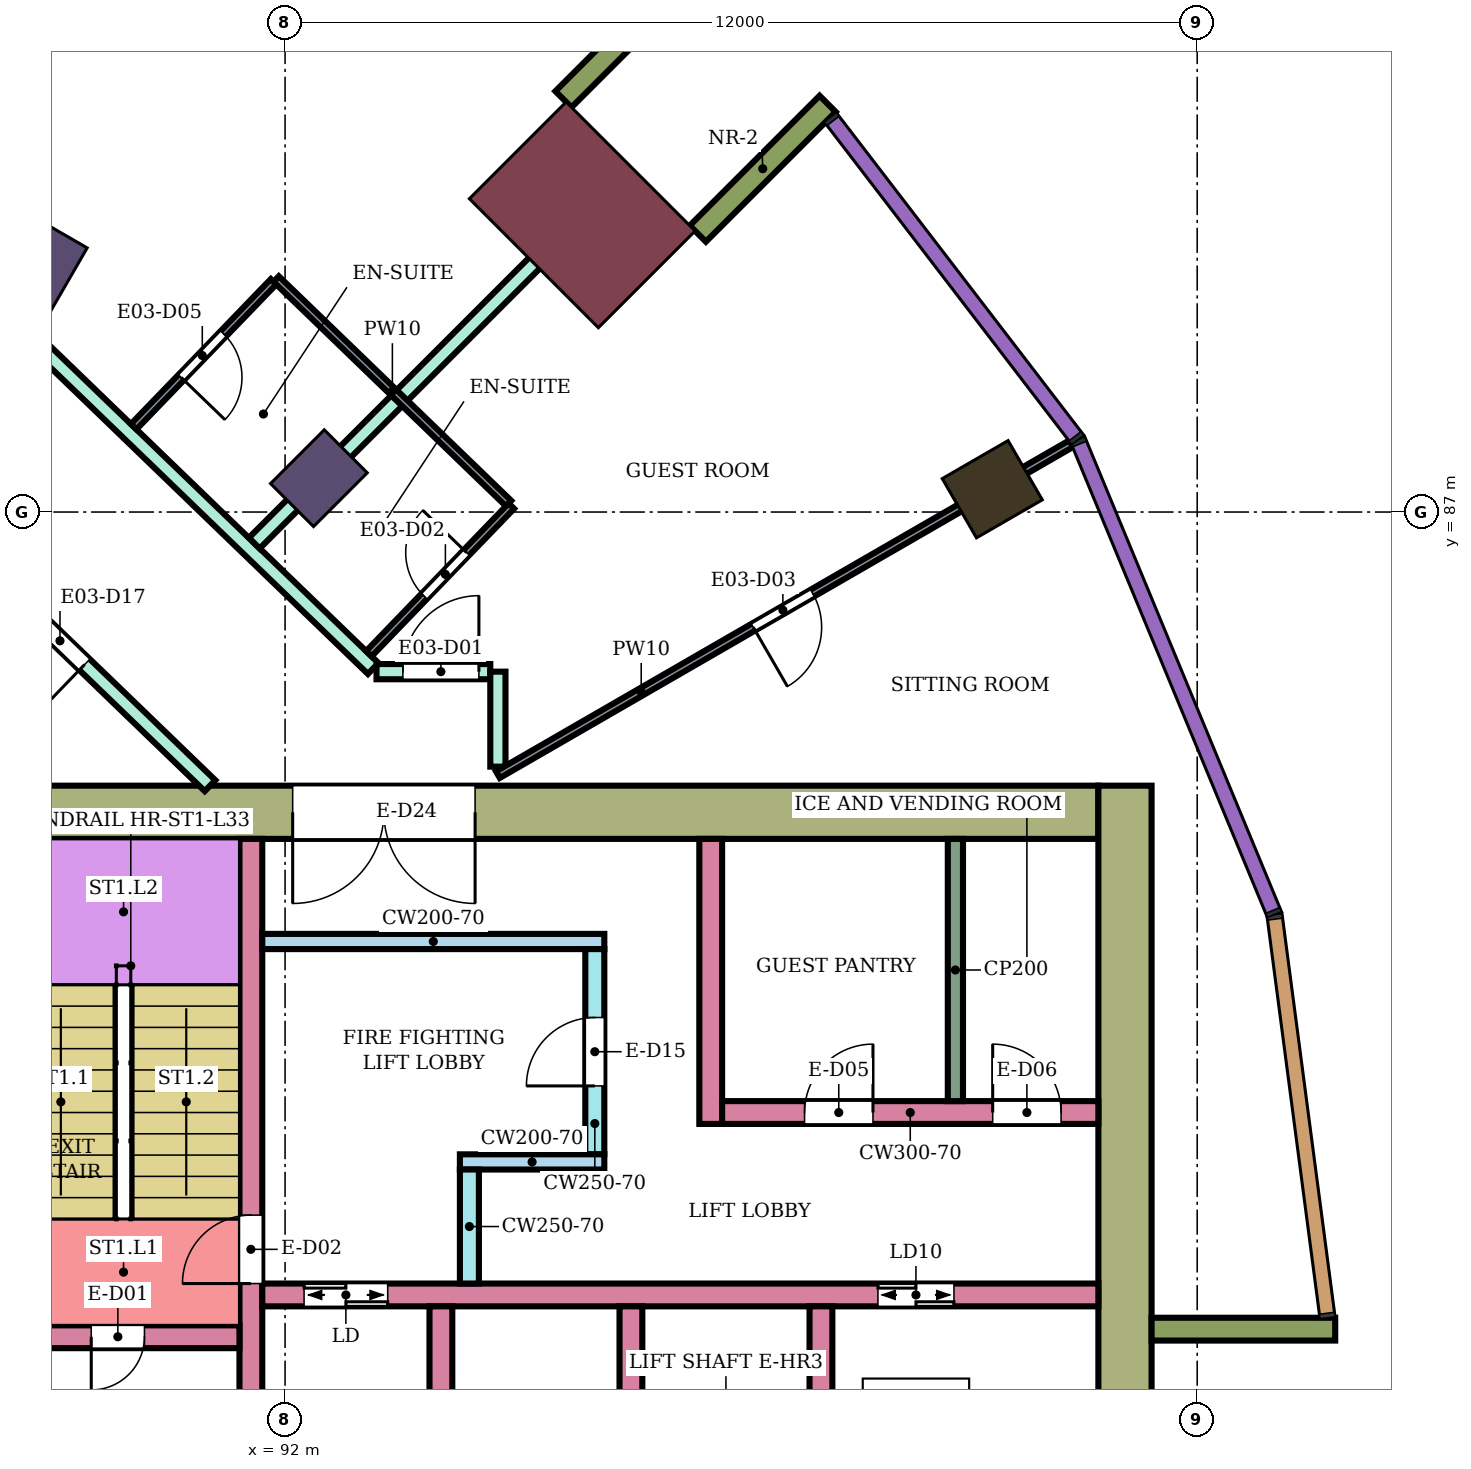
"""IFC4 building model, lengths in metres.
Left out: names, types, materials, properties, quantities, classifications, styles, units other than length and angle.
Written with IfcOpenShell. Run it as: python <this file> out.ifc"""

import sys

from ifc_helpers import new_model, si_unit, direction, frame, frame_2d, origin, origin_2d, place, context, subcontext, project, spatial, rectangle, extrude, element, fill, save


model = new_model("IFC4")
c1 = context("Model", 3, precision=1e-05, world=origin(), true_north=direction((0.0, 1.0)))
c2 = subcontext(c1, "Body", "Model", "MODEL_VIEW")
j1 = project(units=[si_unit("LENGTHUNIT", "METRE"), si_unit("PLANEANGLEUNIT", "RADIAN")], contexts=[c1])
p1 = place(None, origin())
s1 = spatial("IfcSite", under=j1, at=p1, CompositionType="ELEMENT")
p2 = place(p1, origin())
s2 = spatial("IfcBuilding", under=s1, at=p2, CompositionType="ELEMENT")
p3 = place(p2, frame((0.0, 0.0, 141.9)))
s3 = spatial("IfcBuildingStorey", under=s2, at=p3, CompositionType="ELEMENT", Elevation=141.9)
p4 = place(p3, frame((101.304, 87.3, 0.0), z_axis=(0.0, 0.0, 1.0), x_axis=(0.866025403784, 0.5, 0.0)))
e1 = element("IfcColumn", 1, at=p4, inside=s3, PredefinedType="COLUMN", context=c2, shape_type="SweptSolid", body=[
    extrude(rectangle(XDim=1.0, YDim=0.9, at=origin_2d()), origin(), (0.0, 0.0, 1.0), 3.9),
])
for number, where, z_axis, x_axis in (
    (2, (92.445, 87.445, 0.0), (0.0, 0.0, 1.0), (0.707, 0.707, 0.0)),
    (3, (88.8, 90.242, 0.0), (0.0, 0.0, 1.0), (0.5, 0.866, 0.0)),
):
    element("IfcColumn", number, at=place(p3, frame(where, z_axis=z_axis, x_axis=x_axis)), inside=s3, PredefinedType="COLUMN", context=c2, shape_type="SweptSolid", body=[
        extrude(rectangle(XDim=1.0, YDim=0.8, at=origin_2d()), origin(), (0.0, 0.0, 1.0), 3.9),
    ])
p5 = place(p3, frame((95.91, 90.91, 0.0), z_axis=(0.0, 0.0, 1.0), x_axis=(0.707106781187, 0.707106781187, 0.0)))
e4 = element("IfcColumn", 4, at=p5, inside=s3, PredefinedType="COLUMN", context=c2, shape_type="SweptSolid", body=[
    extrude(rectangle(XDim=1.8, YDim=2.4, at=origin_2d()), origin(), (0.0, 0.0, 1.0), 3.9),
])
p6 = place(p3, frame((87.9, 83.05, 0.0), z_axis=(0.0, 0.0, 1.0), x_axis=(1.0, 0.0, 0.0)))
e5 = element("IfcWall", 5, at=p6, inside=s3, PredefinedType="SHEAR", context=c2, shape_type="SweptSolid", body=[
    extrude(rectangle(XDim=14.8, YDim=0.7, at=frame_2d((7.4, 0.0))), origin(), (0.0, 0.0, 1.0), 3.58),
])
p7 = place(p6, frame((4.2, 0.0, 0.0)))
e6 = element("IfcOpeningElement", 6, at=p7, cuts=e5, PredefinedType="OPENING", context=c2, shape_type="SweptSolid", body=[
    extrude(rectangle(XDim=2.4, YDim=2.4, at=frame_2d((1.2, 1.2))), frame((0.0, 0.36, 0.0), z_axis=(0.0, -1.0, 0.0), x_axis=(1.0, 0.0, 0.0)), (0.0, 0.0, 1.0), 0.72),
])
p8 = place(p3, frame((103.05, 66.6, 0.0), z_axis=(0.0, 0.0, 1.0), x_axis=(0.0, 1.0, 0.0)))
e7 = element("IfcWall", 7, at=p8, inside=s3, PredefinedType="SHEAR", context=c2, shape_type="SweptSolid", body=[
    extrude(rectangle(XDim=16.8, YDim=0.7, at=frame_2d((8.4, 0.0))), origin(), (0.0, 0.0, 1.0), 3.58),
])
p9 = place(p3, frame((91.55, 75.0, 0.0), z_axis=(0.0, 0.0, 1.0), x_axis=(0.0, 1.0, 0.0)))
e8 = element("IfcWall", 8, at=p9, inside=s3, PredefinedType="SHEAR", context=c2, shape_type="SweptSolid", body=[
    extrude(rectangle(XDim=7.7, YDim=0.3, at=frame_2d((3.85, 0.0))), origin(), (0.0, 0.0, 1.0), 3.58),
])
p10 = place(p9, frame((1.85, 0.0, 0.0)))
e9 = element("IfcOpeningElement", 9, at=p10, cuts=e8, PredefinedType="OPENING", context=c2, shape_type="SweptSolid", body=[
    extrude(rectangle(XDim=0.9, YDim=2.1, at=frame_2d((0.45, 1.05))), frame((0.0, 0.16, 0.0), z_axis=(0.0, -1.0, 0.0), x_axis=(1.0, 0.0, 0.0)), (0.0, 0.0, 1.0), 0.32),
])
p11 = place(p3, frame((88.35, 76.15, 0.0), z_axis=(0.0, 0.0, 1.0), x_axis=(1.0, 0.0, 0.0)))
e10 = element("IfcWall", 10, at=p11, inside=s3, PredefinedType="SHEAR", context=c2, shape_type="SweptSolid", body=[
    extrude(rectangle(XDim=3.05, YDim=0.3, at=frame_2d((1.525, 0.0))), origin(), (0.0, 0.0, 1.0), 3.58),
])
p12 = place(p11, frame((1.1, 0.0, 0.0)))
e11 = element("IfcOpeningElement", 11, at=p12, cuts=e10, PredefinedType="OPENING", context=c2, shape_type="SweptSolid", body=[
    extrude(rectangle(XDim=0.7, YDim=2.0, at=frame_2d((0.35, 1.0))), frame((0.0, 0.16, 0.0), z_axis=(0.0, -1.0, 0.0), x_axis=(1.0, 0.0, 0.0)), (0.0, 0.0, 1.0), 0.32),
])
p13 = place(p3, frame((91.7, 76.7, 0.0), z_axis=(0.0, 0.0, 1.0), x_axis=(1.0, 0.0, 0.0)))
e12 = element("IfcWall", 12, at=p13, inside=s3, PredefinedType="SHEAR", context=c2, shape_type="SweptSolid", body=[
    extrude(rectangle(XDim=11.0, YDim=0.3, at=frame_2d((5.5, 0.0))), origin(), (0.0, 0.0, 1.0), 3.58),
])
p14 = place(p13, frame((0.55, 0.0, 0.0)))
e13 = element("IfcOpeningElement", 13, at=p14, cuts=e12, PredefinedType="OPENING", context=c2, shape_type="SweptSolid", body=[
    extrude(rectangle(XDim=1.1, YDim=2.1, at=frame_2d((0.55, 1.05))), frame((0.0, 0.16, 0.0), z_axis=(0.0, -1.0, 0.0), x_axis=(1.0, 0.0, 0.0)), (0.0, 0.0, 1.0), 0.32),
])
p15 = place(p13, frame((8.1, 0.0, 0.0)))
e14 = element("IfcOpeningElement", 14, at=p15, cuts=e12, PredefinedType="OPENING", context=c2, shape_type="SweptSolid", body=[
    extrude(rectangle(XDim=1.0, YDim=2.1, at=frame_2d((0.5, 1.05))), frame((0.0, 0.16, 0.0), z_axis=(0.0, -1.0, 0.0), x_axis=(1.0, 0.0, 0.0)), (0.0, 0.0, 1.0), 0.32),
])
for number, where, z_axis, x_axis in (
    (15, (94.05, 74.0, 0.0), (0.0, 0.0, 1.0), (0.0, 1.0, 0.0)),
    (16, (96.55, 74.0, 0.0), (0.0, 0.0, 1.0), (0.0, 1.0, 0.0)),
    (17, (99.05, 74.0, 0.0), (0.0, 0.0, 1.0), (0.0, 1.0, 0.0)),
):
    element("IfcWall", number, at=place(p3, frame(where, z_axis=z_axis, x_axis=x_axis)), inside=s3, PredefinedType="SHEAR", context=c2, shape_type="SweptSolid", body=[
        extrude(rectangle(XDim=2.55, YDim=0.3, at=frame_2d((1.275, 0.0))), origin(), (0.0, 0.0, 1.0), 3.58),
    ])
p16 = place(p3, frame((91.7, 81.35, 0.0), z_axis=(0.0, 0.0, 1.0), x_axis=(1.0, 0.0, 0.0)))
e18 = element("IfcWall", 18, at=p16, inside=s3, PredefinedType="SHEAR", context=c2, shape_type="SweptSolid", body=[
    extrude(rectangle(XDim=4.5, YDim=0.2, at=frame_2d((2.25, 0.0))), origin(), (0.0, 0.0, 1.0), 3.58),
])
p17 = place(p3, frame((96.075, 78.55, 0.0), z_axis=(0.0, 0.0, 1.0), x_axis=(0.0, 1.0, 0.0)))
e19 = element("IfcWall", 19, at=p17, inside=s3, PredefinedType="SHEAR", context=c2, shape_type="SweptSolid", body=[
    extrude(rectangle(XDim=2.7, YDim=0.25, at=frame_2d((1.35, 0.0))), origin(), (0.0, 0.0, 1.0), 3.58),
])
p18 = place(p17, frame((0.9, 0.0, 0.0)))
e20 = element("IfcOpeningElement", 20, at=p18, cuts=e19, PredefinedType="OPENING", context=c2, shape_type="SweptSolid", body=[
    extrude(rectangle(XDim=0.9, YDim=2.1, at=frame_2d((0.45, 1.05))), frame((0.0, 0.135, 0.0), z_axis=(0.0, -1.0, 0.0), x_axis=(1.0, 0.0, 0.0)), (0.0, 0.0, 1.0), 0.27),
])
p19 = place(p3, frame((94.3, 78.45, 0.0), z_axis=(0.0, 0.0, 1.0), x_axis=(1.0, 0.0, 0.0)))
e21 = element("IfcWall", 21, at=p19, inside=s3, PredefinedType="SHEAR", context=c2, shape_type="SweptSolid", body=[
    extrude(rectangle(XDim=1.9, YDim=0.2, at=frame_2d((0.95, 0.0))), origin(), (0.0, 0.0, 1.0), 3.58),
])
p20 = place(p3, frame((94.425, 76.85, 0.0), z_axis=(0.0, 0.0, 1.0), x_axis=(0.0, 1.0, 0.0)))
e22 = element("IfcWall", 22, at=p20, inside=s3, PredefinedType="SHEAR", context=c2, shape_type="SweptSolid", body=[
    extrude(rectangle(XDim=1.5, YDim=0.25, at=frame_2d((0.75, 0.0))), origin(), (0.0, 0.0, 1.0), 3.58),
])
p21 = place(p3, frame((97.6, 78.95, 0.0), z_axis=(0.0, 0.0, 1.0), x_axis=(0.0, 1.0, 0.0)))
e23 = element("IfcWall", 23, at=p21, inside=s3, PredefinedType="SHEAR", context=c2, shape_type="SweptSolid", body=[
    extrude(rectangle(XDim=3.75, YDim=0.3, at=frame_2d((1.875, 0.0))), origin(), (0.0, 0.0, 1.0), 3.58),
])
p22 = place(p3, frame((97.75, 79.1, 0.0), z_axis=(0.0, 0.0, 1.0), x_axis=(1.0, 0.0, 0.0)))
e24 = element("IfcWall", 24, at=p22, inside=s3, PredefinedType="SHEAR", context=c2, shape_type="SweptSolid", body=[
    extrude(rectangle(XDim=4.95, YDim=0.3, at=frame_2d((2.475, 0.0))), origin(), (0.0, 0.0, 1.0), 3.58),
])
p23 = place(p22, frame((1.084, 0.0, 0.0)))
e25 = element("IfcOpeningElement", 25, at=p23, cuts=e24, PredefinedType="OPENING", context=c2, shape_type="SweptSolid", body=[
    extrude(rectangle(XDim=0.9, YDim=2.1, at=frame_2d((0.45, 1.05))), frame((0.0, 0.16, 0.0), z_axis=(0.0, -1.0, 0.0), x_axis=(1.0, 0.0, 0.0)), (0.0, 0.0, 1.0), 0.32),
])
p24 = place(p22, frame((3.56, 0.0, 0.0)))
e26 = element("IfcOpeningElement", 26, at=p24, cuts=e24, PredefinedType="OPENING", context=c2, shape_type="SweptSolid", body=[
    extrude(rectangle(XDim=0.9, YDim=2.1, at=frame_2d((0.45, 1.05))), frame((0.0, 0.16, 0.0), z_axis=(0.0, -1.0, 0.0), x_axis=(1.0, 0.0, 0.0)), (0.0, 0.0, 1.0), 0.32),
])
for number, where, z_axis, x_axis in (
    (27, (103.4, 76.25, 0.0), (0.0, 0.0, 1.0), (1.0, 0.0, 0.0)),
    (28, (97.43, 90.662, 0.0), (0.0, 0.0, 1.0), (0.707, 0.707, 0.0)),
    (29, (95.662, 92.43, 0.0), (0.0, 0.0, 1.0), (0.707, 0.707, 0.0)),
):
    element("IfcWall", number, at=place(p3, frame(where, z_axis=z_axis, x_axis=x_axis)), inside=s3, PredefinedType="NOTDEFINED", context=c2, shape_type="SweptSolid", body=[
        extrude(rectangle(XDim=2.416, YDim=0.3, at=frame_2d((1.208, 0.0))), origin(), (0.0, 0.0, 1.0), 3.9),
    ])
p25 = place(p3, frame((87.064, 87.211, 0.0), z_axis=(0.0, 0.0, 1.0), x_axis=(0.719562412484, -0.694427774891, 0.0)))
e30 = element("IfcWall", 30, at=p25, inside=s3, PredefinedType="PARTITIONING", context=c2, shape_type="SweptSolid", body=[
    extrude(rectangle(XDim=5.488, YDim=0.2, at=frame_2d((2.744, 0.0))), origin(), (0.0, 0.0, 1.0), 3.45),
])
p26 = place(p25, frame((2.294, 0.0, 0.0)))
e31 = element("IfcOpeningElement", 31, at=p26, cuts=e30, PredefinedType="OPENING", context=c2, shape_type="SweptSolid", body=[
    extrude(rectangle(XDim=0.9, YDim=2.1, at=frame_2d((0.45, 1.05))), frame((0.0, 0.11, 0.0), z_axis=(0.0, -1.0, 0.0), x_axis=(1.0, 0.0, 0.0)), (0.0, 0.0, 1.0), 0.22),
])
p27 = place(p3, frame((88.386, 89.549, 0.0), z_axis=(0.0, 0.0, 1.0), x_axis=(0.719507339337, -0.694484836869, 0.0)))
e32 = element("IfcWall", 32, at=p27, inside=s3, PredefinedType="PARTITIONING", context=c2, shape_type="SweptSolid", body=[
    extrude(rectangle(XDim=6.635, YDim=0.2, at=frame_2d((3.317, 0.0))), origin(), (0.0, 0.0, 1.0), 3.45),
])
p28 = place(p3, frame((91.595, 86.591, 0.0), z_axis=(0.0, 0.0, 1.0), x_axis=(0.707214399597, 0.706999146394, 0.0)))
e33 = element("IfcWall", 33, at=p28, inside=s3, PredefinedType="PARTITIONING", context=c2, shape_type="SweptSolid", body=[
    extrude(rectangle(XDim=6.805, YDim=0.2, at=frame_2d((3.403, 0.0))), origin(), (0.0, 0.0, 1.0), 3.45),
])
p29 = place(p3, frame((93.203, 84.9, 0.0), z_axis=(0.0, 0.0, 1.0), x_axis=(1.0, 0.0, 0.0)))
e34 = element("IfcWall", 34, at=p29, inside=s3, PredefinedType="PARTITIONING", context=c2, shape_type="SweptSolid", body=[
    extrude(rectangle(XDim=1.497, YDim=0.2, at=frame_2d((0.749, 0.0))), origin(), (0.0, 0.0, 1.0), 3.45),
])
p30 = place(p29, frame((0.347, 0.0, 0.0)))
e35 = element("IfcOpeningElement", 35, at=p30, cuts=e34, PredefinedType="OPENING", context=c2, shape_type="SweptSolid", body=[
    extrude(rectangle(XDim=1.0, YDim=2.1, at=frame_2d((0.5, 1.05))), frame((0.0, 0.11, 0.0), z_axis=(0.0, -1.0, 0.0), x_axis=(1.0, 0.0, 0.0)), (0.0, 0.0, 1.0), 0.22),
])
p31 = place(p3, frame((94.8, 83.65, 0.0), z_axis=(0.0, 0.0, 1.0), x_axis=(0.0, 1.0, 0.0)))
e36 = element("IfcWall", 36, at=p31, inside=s3, PredefinedType="PARTITIONING", context=c2, shape_type="SweptSolid", body=[
    extrude(rectangle(XDim=1.25, YDim=0.2, at=frame_2d((0.625, 0.0))), origin(), (0.0, 0.0, 1.0), 3.45),
])
p32 = place(p3, frame((90.008, 88.123, 0.0), z_axis=(0.0, 0.0, 1.0), x_axis=(0.694372521817, 0.719615731447, 0.0)))
e37 = element("IfcWall", 37, at=p32, inside=s3, PredefinedType="PARTITIONING", context=c2, shape_type="SweptSolid", body=[
    extrude(rectangle(XDim=2.65, YDim=0.1, at=frame_2d((1.325, 0.0))), origin(), (0.0, 0.0, 1.0), 3.45),
])
p33 = place(p32, frame((0.9, 0.0, 0.0)))
e38 = element("IfcOpeningElement", 38, at=p33, cuts=e37, PredefinedType="OPENING", context=c2, shape_type="SweptSolid", body=[
    extrude(rectangle(XDim=0.8, YDim=2.1, at=frame_2d((0.4, 1.05))), frame((0.0, 0.06, 0.0), z_axis=(0.0, -1.0, 0.0), x_axis=(1.0, 0.0, 0.0)), (0.0, 0.0, 1.0), 0.12),
])
p34 = place(p3, frame((91.883, 90.066, 0.0), z_axis=(0.0, 0.0, 1.0), x_axis=(0.719460839421, -0.694533008963, 0.0)))
e39 = element("IfcWall", 39, at=p34, inside=s3, PredefinedType="PARTITIONING", context=c2, shape_type="SweptSolid", body=[
    extrude(rectangle(XDim=4.25, YDim=0.1, at=frame_2d((2.125, 0.0))), origin(), (0.0, 0.0, 1.0), 3.45),
])
p35 = place(p3, frame((93.103, 85.136, 0.0), z_axis=(0.0, 0.0, 1.0), x_axis=(0.694287838235, 0.719697434815, 0.0)))
e40 = element("IfcWall", 40, at=p35, inside=s3, PredefinedType="PARTITIONING", context=c2, shape_type="SweptSolid", body=[
    extrude(rectangle(XDim=2.7, YDim=0.1, at=frame_2d((1.35, 0.0))), origin(), (0.0, 0.0, 1.0), 3.45),
])
p36 = place(p35, frame((1.05, 0.0, 0.0)))
e41 = element("IfcOpeningElement", 41, at=p36, cuts=e40, PredefinedType="OPENING", context=c2, shape_type="SweptSolid", body=[
    extrude(rectangle(XDim=0.8, YDim=2.1, at=frame_2d((0.4, 1.05))), frame((0.0, 0.06, 0.0), z_axis=(0.0, -1.0, 0.0), x_axis=(1.0, 0.0, 0.0)), (0.0, 0.0, 1.0), 0.12),
])
p37 = place(p3, frame((94.8, 83.545, 0.0), z_axis=(0.0, 0.0, 1.0), x_axis=(0.86602264145, 0.500004784474, 0.0)))
e42 = element("IfcWall", 42, at=p37, inside=s3, PredefinedType="PARTITIONING", context=c2, shape_type="SweptSolid", body=[
    extrude(rectangle(XDim=8.708, YDim=0.1, at=frame_2d((4.354, 0.0))), origin(), (0.0, 0.0, 1.0), 3.45),
])
p38 = place(p37, frame((3.879, 0.0, 0.0)))
e43 = element("IfcOpeningElement", 43, at=p38, cuts=e42, PredefinedType="OPENING", context=c2, shape_type="SweptSolid", body=[
    extrude(rectangle(XDim=0.9, YDim=2.1, at=frame_2d((0.45, 1.05))), frame((0.0, 0.06, 0.0), z_axis=(0.0, -1.0, 0.0), x_axis=(1.0, 0.0, 0.0)), (0.0, 0.0, 1.0), 0.12),
])
p39 = place(p3, frame((100.819, 79.25, 0.0), z_axis=(0.0, 0.0, 1.0), x_axis=(0.0, 1.0, 0.0)))
e44 = element("IfcWall", 44, at=p39, inside=s3, PredefinedType="PARTITIONING", context=c2, shape_type="SweptSolid", body=[
    extrude(rectangle(XDim=3.45, YDim=0.2, at=frame_2d((1.725, 0.0))), origin(), (0.0, 0.0, 1.0), 3.58),
])
p40 = place(p30, origin())
e45 = element("IfcDoor", 45, at=p40, inside=s3, OperationType="SINGLE_SWING_RIGHT", PredefinedType="DOOR", context=c2, shape_type="SweptSolid", body=[
    extrude(rectangle(XDim=1.0, YDim=2.1, at=frame_2d((0.5, 1.05))), frame((0.0, 0.025, 0.0), z_axis=(0.0, -1.0, 0.0), x_axis=(1.0, 0.0, 0.0)), (0.0, 0.0, 1.0), 0.05),
])
fill(e35, e45)
p41 = place(p36, origin())
e46 = element("IfcDoor", 46, at=p41, inside=s3, OperationType="SINGLE_SWING_RIGHT", PredefinedType="DOOR", context=c2, shape_type="SweptSolid", body=[
    extrude(rectangle(XDim=0.8, YDim=2.1, at=frame_2d((0.4, 1.05))), frame((0.0, 0.025, 0.0), z_axis=(0.0, -1.0, 0.0), x_axis=(1.0, 0.0, 0.0)), (0.0, 0.0, 1.0), 0.05),
])
fill(e41, e46)
p42 = place(p38, frame((0.9, 0.0, 0.0), z_axis=(0.0, 0.0, 1.0), x_axis=(-1.0, 0.0, 0.0)))
e47 = element("IfcDoor", 47, at=p42, inside=s3, OperationType="SINGLE_SWING_RIGHT", PredefinedType="DOOR", context=c2, shape_type="SweptSolid", body=[
    extrude(rectangle(XDim=0.9, YDim=2.1, at=frame_2d((0.45, 1.05))), frame((0.0, 0.025, 0.0), z_axis=(0.0, -1.0, 0.0), x_axis=(1.0, 0.0, 0.0)), (0.0, 0.0, 1.0), 0.05),
])
fill(e43, e47)
p43 = place(p33, frame((0.8, 0.0, 0.0), z_axis=(0.0, 0.0, 1.0), x_axis=(-1.0, 0.0, 0.0)))
e48 = element("IfcDoor", 48, at=p43, inside=s3, OperationType="SINGLE_SWING_RIGHT", PredefinedType="DOOR", context=c2, shape_type="SweptSolid", body=[
    extrude(rectangle(XDim=0.8, YDim=2.1, at=frame_2d((0.4, 1.05))), frame((0.0, 0.025, 0.0), z_axis=(0.0, -1.0, 0.0), x_axis=(1.0, 0.0, 0.0)), (0.0, 0.0, 1.0), 0.05),
])
fill(e38, e48)
p44 = place(p26, frame((0.9, 0.0, 0.0), z_axis=(0.0, 0.0, 1.0), x_axis=(-1.0, 0.0, 0.0)))
e49 = element("IfcDoor", 49, at=p44, inside=s3, OperationType="SINGLE_SWING_LEFT", PredefinedType="DOOR", context=c2, shape_type="SweptSolid", body=[
    extrude(rectangle(XDim=0.9, YDim=2.1, at=frame_2d((0.45, 1.05))), frame((0.0, 0.025, 0.0), z_axis=(0.0, -1.0, 0.0), x_axis=(1.0, 0.0, 0.0)), (0.0, 0.0, 1.0), 0.05),
])
fill(e31, e49)
p45 = place(p12, frame((0.7, 0.0, 0.0), z_axis=(0.0, 0.0, 1.0), x_axis=(-1.0, 0.0, 0.0)))
e50 = element("IfcDoor", 50, at=p45, inside=s3, OperationType="SINGLE_SWING_RIGHT", PredefinedType="DOOR", context=c2, shape_type="SweptSolid", body=[
    extrude(rectangle(XDim=0.7, YDim=2.0, at=frame_2d((0.35, 1.0))), frame((0.0, 0.025, 0.0), z_axis=(0.0, -1.0, 0.0), x_axis=(1.0, 0.0, 0.0)), (0.0, 0.0, 1.0), 0.05),
])
fill(e11, e50)
p46 = place(p10, origin())
e51 = element("IfcDoor", 51, at=p46, inside=s3, OperationType="SINGLE_SWING_LEFT", PredefinedType="DOOR", context=c2, shape_type="SweptSolid", body=[
    extrude(rectangle(XDim=0.9, YDim=2.1, at=frame_2d((0.45, 1.05))), frame((0.0, 0.025, 0.0), z_axis=(0.0, -1.0, 0.0), x_axis=(1.0, 0.0, 0.0)), (0.0, 0.0, 1.0), 0.05),
])
fill(e9, e51)
p47 = place(p14, origin())
e52 = element("IfcDoor", 52, at=p47, inside=s3, OperationType="DOUBLE_DOOR_SLIDING", PredefinedType="DOOR", context=c2, shape_type="SweptSolid", body=[
    extrude(rectangle(XDim=1.1, YDim=2.1, at=frame_2d((0.55, 1.05))), frame((0.0, 0.025, 0.0), z_axis=(0.0, -1.0, 0.0), x_axis=(1.0, 0.0, 0.0)), (0.0, 0.0, 1.0), 0.05),
])
fill(e13, e52)
p48 = place(p15, origin())
e53 = element("IfcDoor", 53, at=p48, inside=s3, OperationType="DOUBLE_DOOR_SLIDING", PredefinedType="DOOR", context=c2, shape_type="SweptSolid", body=[
    extrude(rectangle(XDim=1.0, YDim=2.1, at=frame_2d((0.5, 1.05))), frame((0.0, 0.025, 0.0), z_axis=(0.0, -1.0, 0.0), x_axis=(1.0, 0.0, 0.0)), (0.0, 0.0, 1.0), 0.05),
])
fill(e14, e53)
p49 = place(p18, origin())
e54 = element("IfcDoor", 54, at=p49, inside=s3, OperationType="SINGLE_SWING_LEFT", PredefinedType="DOOR", context=c2, shape_type="SweptSolid", body=[
    extrude(rectangle(XDim=0.9, YDim=2.1, at=frame_2d((0.45, 1.05))), frame((0.0, 0.025, 0.0), z_axis=(0.0, -1.0, 0.0), x_axis=(1.0, 0.0, 0.0)), (0.0, 0.0, 1.0), 0.05),
])
fill(e20, e54)
p50 = place(p23, origin())
e55 = element("IfcDoor", 55, at=p50, inside=s3, OperationType="SINGLE_SWING_RIGHT", PredefinedType="DOOR", context=c2, shape_type="SweptSolid", body=[
    extrude(rectangle(XDim=0.9, YDim=2.1, at=frame_2d((0.45, 1.05))), frame((0.0, 0.025, 0.0), z_axis=(0.0, -1.0, 0.0), x_axis=(1.0, 0.0, 0.0)), (0.0, 0.0, 1.0), 0.05),
])
fill(e25, e55)
p51 = place(p24, origin())
e56 = element("IfcDoor", 56, at=p51, inside=s3, OperationType="SINGLE_SWING_LEFT", PredefinedType="DOOR", context=c2, shape_type="SweptSolid", body=[
    extrude(rectangle(XDim=0.9, YDim=2.1, at=frame_2d((0.45, 1.05))), frame((0.0, 0.025, 0.0), z_axis=(0.0, -1.0, 0.0), x_axis=(1.0, 0.0, 0.0)), (0.0, 0.0, 1.0), 0.05),
])
fill(e26, e56)
p52 = place(p7, frame((2.4, 0.0, 0.0), z_axis=(0.0, 0.0, 1.0), x_axis=(-1.0, 0.0, 0.0)))
e57 = element("IfcDoor", 57, at=p52, inside=s3, OperationType="DOUBLE_DOOR_SINGLE_SWING", PredefinedType="DOOR", context=c2, shape_type="SweptSolid", body=[
    extrude(rectangle(XDim=2.4, YDim=2.4, at=frame_2d((1.2, 1.2))), frame((0.0, 0.025, 0.0), z_axis=(0.0, -1.0, 0.0), x_axis=(1.0, 0.0, 0.0)), (0.0, 0.0, 1.0), 0.05),
])
fill(e6, e57)
save(model, sys.argv[1])
